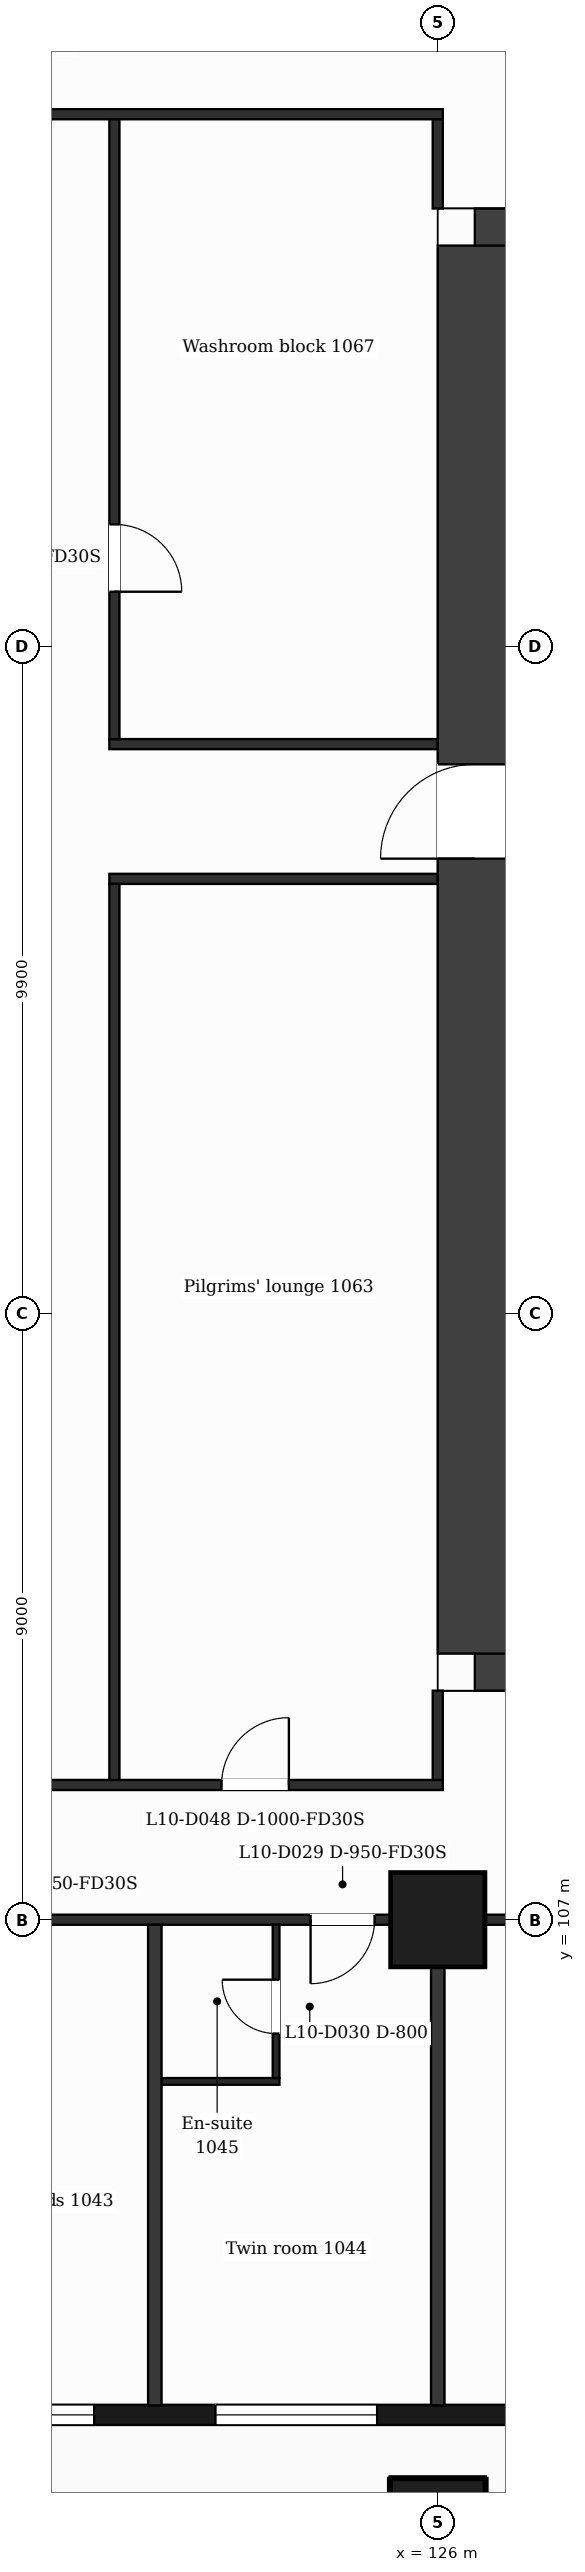
"""IFC4 building model, lengths in metres.
Left out: names, types, materials, properties, quantities, classifications, styles, units other than length and angle.
Written with IfcOpenShell. Run it as: python <this file> out.ifc"""

import sys

from ifc_helpers import new_model, si_unit, direction, frame, frame_2d, origin, origin_2d, place, context, subcontext, project, spatial, rectangle, extrude, element, fill, save


model = new_model("IFC4")
c1 = context("Model", 3, precision=1e-05, world=origin(), true_north=direction((0.0, 1.0)))
c2 = subcontext(c1, "Body", "Model", "MODEL_VIEW")
j1 = project(units=[si_unit("LENGTHUNIT", "METRE"), si_unit("PLANEANGLEUNIT", "RADIAN")], contexts=[c1])
p1 = place(None, origin())
s1 = spatial("IfcSite", under=j1, at=p1, CompositionType="ELEMENT")
p2 = place(p1, origin())
s2 = spatial("IfcBuilding", under=s1, at=p2, CompositionType="ELEMENT")
p3 = place(p2, frame((0.0, 0.0, 53.0)))
s3 = spatial("IfcBuildingStorey", under=s2, at=p3, CompositionType="ELEMENT", Elevation=53.0)
p4 = place(p3, frame((126.55, 131.85, 0.0), z_axis=(0.0, 0.0, 1.0), x_axis=(1.0, 0.0, 0.0)))
e1 = element("IfcWall", 1, at=p4, inside=s3, PredefinedType="SHEAR", context=c2, shape_type="SweptSolid", body=[
    extrude(rectangle(XDim=11.138, YDim=1.1, at=frame_2d((5.569, 0.0))), origin(), (0.0, 0.0, 1.0), 3.5),
])
p5 = place(p4, frame((3.386, 0.0, 0.0)))
e2 = element("IfcOpeningElement", 2, at=p5, cuts=e1, PredefinedType="OPENING", context=c2, shape_type="SweptSolid", body=[
    extrude(rectangle(XDim=1.2, YDim=2.1, at=frame_2d((0.6, 1.05))), frame((0.0, 0.56, 0.0), z_axis=(0.0, -1.0, 0.0), x_axis=(1.0, 0.0, 0.0)), (0.0, 0.0, 1.0), 1.12),
])
p6 = place(p3, frame((140.502, 110.95, 0.0), z_axis=(0.0, 0.0, 1.0), x_axis=(-1.0, 0.0, 0.0)))
e3 = element("IfcWall", 3, at=p6, inside=s3, PredefinedType="SHEAR", context=c2, shape_type="SweptSolid", body=[
    extrude(rectangle(XDim=13.952, YDim=1.1, at=frame_2d((6.976, 0.0))), origin(), (0.0, 0.0, 1.0), 3.5),
])
p7 = place(p6, frame((6.804, 0.0, 0.0)))
e4 = element("IfcOpeningElement", 4, at=p7, cuts=e3, PredefinedType="OPENING", context=c2, shape_type="SweptSolid", body=[
    extrude(rectangle(XDim=1.4, YDim=2.1, at=frame_2d((0.7, 1.05))), frame((0.0, 0.56, 0.0), z_axis=(0.0, -1.0, 0.0), x_axis=(1.0, 0.0, 0.0)), (0.0, 0.0, 1.0), 1.12),
])
p8 = place(p3, frame((126.55, 110.95, 0.0), z_axis=(0.0, 0.0, 1.0), x_axis=(0.0, 1.0, 0.0)))
e5 = element("IfcWall", 5, at=p8, inside=s3, PredefinedType="SHEAR", context=c2, shape_type="SweptSolid", body=[
    extrude(rectangle(XDim=20.9, YDim=1.1, at=frame_2d((10.45, 0.0))), origin(), (0.0, 0.0, 1.0), 3.5),
])
p9 = place(p8, frame((11.8, 0.0, 0.0)))
e6 = element("IfcOpeningElement", 6, at=p9, cuts=e5, PredefinedType="OPENING", context=c2, shape_type="SweptSolid", body=[
    extrude(rectangle(XDim=1.4, YDim=2.1, at=frame_2d((0.7, 1.05))), frame((0.0, 0.56, 0.0), z_axis=(0.0, -1.0, 0.0), x_axis=(1.0, 0.0, 0.0)), (0.0, 0.0, 1.0), 1.12),
])
for number, where, z_axis, x_axis in (
    (7, (126.0, 98.0, 0.0), (0.0, 0.0, 1.0), (1.0, 0.0, 0.0)),
    (8, (126.0, 107.0, 0.0), (0.0, 0.0, 1.0), (1.0, 0.0, 0.0)),
):
    element("IfcColumn", number, at=place(p3, frame(where, z_axis=z_axis, x_axis=x_axis)), inside=s3, PredefinedType="COLUMN", context=c2, shape_type="SweptSolid", body=[
        extrude(rectangle(XDim=1.4, YDim=1.4, at=origin_2d()), origin(), (0.0, 0.0, 1.0), 3.5),
    ])
p10 = place(p3, frame((89.85, 99.65, 0.0), z_axis=(0.0, 0.0, 1.0), x_axis=(1.0, 0.0, 0.0)))
e9 = element("IfcWall", 9, at=p10, inside=s3, PredefinedType="SOLIDWALL", context=c2, shape_type="SweptSolid", body=[
    extrude(rectangle(XDim=47.25, YDim=0.3, at=frame_2d((23.625, 0.0))), origin(), (0.0, 0.0, 1.0), 3.18),
])
p11 = place(p10, frame((0.725, 0.0, 0.9)))
e10 = element("IfcOpeningElement", 10, at=p11, cuts=e9, PredefinedType="OPENING", context=c2, shape_type="SweptSolid", body=[
    extrude(rectangle(XDim=1.2, YDim=2.1, at=frame_2d((0.6, 1.05))), frame((0.0, 0.16, 0.0), z_axis=(0.0, -1.0, 0.0), x_axis=(1.0, 0.0, 0.0)), (0.0, 0.0, 1.0), 0.32),
])
p12 = place(p10, frame((3.45, 0.0, 0.9)))
e11 = element("IfcOpeningElement", 11, at=p12, cuts=e9, PredefinedType="OPENING", context=c2, shape_type="SweptSolid", body=[
    extrude(rectangle(XDim=2.4, YDim=2.1, at=frame_2d((1.2, 1.05))), frame((0.0, 0.16, 0.0), z_axis=(0.0, -1.0, 0.0), x_axis=(1.0, 0.0, 0.0)), (0.0, 0.0, 1.0), 0.32),
])
p13 = place(p10, frame((8.25, 0.0, 0.9)))
e12 = element("IfcOpeningElement", 12, at=p13, cuts=e9, PredefinedType="OPENING", context=c2, shape_type="SweptSolid", body=[
    extrude(rectangle(XDim=1.2, YDim=2.1, at=frame_2d((0.6, 1.05))), frame((0.0, 0.16, 0.0), z_axis=(0.0, -1.0, 0.0), x_axis=(1.0, 0.0, 0.0)), (0.0, 0.0, 1.0), 0.32),
])
p14 = place(p10, frame((12.45, 0.0, 0.9)))
e13 = element("IfcOpeningElement", 13, at=p14, cuts=e9, PredefinedType="OPENING", context=c2, shape_type="SweptSolid", body=[
    extrude(rectangle(XDim=1.2, YDim=2.1, at=frame_2d((0.6, 1.05))), frame((0.0, 0.16, 0.0), z_axis=(0.0, -1.0, 0.0), x_axis=(1.0, 0.0, 0.0)), (0.0, 0.0, 1.0), 0.32),
])
p15 = place(p10, frame((16.05, 0.0, 0.9)))
e14 = element("IfcOpeningElement", 14, at=p15, cuts=e9, PredefinedType="OPENING", context=c2, shape_type="SweptSolid", body=[
    extrude(rectangle(XDim=2.4, YDim=2.1, at=frame_2d((1.2, 1.05))), frame((0.0, 0.16, 0.0), z_axis=(0.0, -1.0, 0.0), x_axis=(1.0, 0.0, 0.0)), (0.0, 0.0, 1.0), 0.32),
])
p16 = place(p10, frame((20.25, 0.0, 0.9)))
e15 = element("IfcOpeningElement", 15, at=p16, cuts=e9, PredefinedType="OPENING", context=c2, shape_type="SweptSolid", body=[
    extrude(rectangle(XDim=2.4, YDim=2.1, at=frame_2d((1.2, 1.05))), frame((0.0, 0.16, 0.0), z_axis=(0.0, -1.0, 0.0), x_axis=(1.0, 0.0, 0.0)), (0.0, 0.0, 1.0), 0.32),
])
p17 = place(p10, frame((25.05, 0.0, 0.0)))
e16 = element("IfcOpeningElement", 16, at=p17, cuts=e9, PredefinedType="OPENING", context=c2, shape_type="SweptSolid", body=[
    extrude(rectangle(XDim=1.2, YDim=2.4, at=frame_2d((0.6, 1.2))), frame((0.0, 0.16, 0.0), z_axis=(0.0, -1.0, 0.0), x_axis=(1.0, 0.0, 0.0)), (0.0, 0.0, 1.0), 0.32),
])
p18 = place(p10, frame((28.65, 0.0, 0.9)))
e17 = element("IfcOpeningElement", 17, at=p18, cuts=e9, PredefinedType="OPENING", context=c2, shape_type="SweptSolid", body=[
    extrude(rectangle(XDim=2.4, YDim=2.1, at=frame_2d((1.2, 1.05))), frame((0.0, 0.16, 0.0), z_axis=(0.0, -1.0, 0.0), x_axis=(1.0, 0.0, 0.0)), (0.0, 0.0, 1.0), 0.32),
])
p19 = place(p10, frame((32.85, 0.0, 0.9)))
e18 = element("IfcOpeningElement", 18, at=p19, cuts=e9, PredefinedType="OPENING", context=c2, shape_type="SweptSolid", body=[
    extrude(rectangle(XDim=2.4, YDim=2.1, at=frame_2d((1.2, 1.05))), frame((0.0, 0.16, 0.0), z_axis=(0.0, -1.0, 0.0), x_axis=(1.0, 0.0, 0.0)), (0.0, 0.0, 1.0), 0.32),
])
p20 = place(p10, frame((37.65, 0.0, 0.9)))
e19 = element("IfcOpeningElement", 19, at=p20, cuts=e9, PredefinedType="OPENING", context=c2, shape_type="SweptSolid", body=[
    extrude(rectangle(XDim=1.2, YDim=2.1, at=frame_2d((0.6, 1.05))), frame((0.0, 0.16, 0.0), z_axis=(0.0, -1.0, 0.0), x_axis=(1.0, 0.0, 0.0)), (0.0, 0.0, 1.0), 0.32),
])
p21 = place(p10, frame((41.85, 0.0, 0.9)))
e20 = element("IfcOpeningElement", 20, at=p21, cuts=e9, PredefinedType="OPENING", context=c2, shape_type="SweptSolid", body=[
    extrude(rectangle(XDim=1.2, YDim=2.1, at=frame_2d((0.6, 1.05))), frame((0.0, 0.16, 0.0), z_axis=(0.0, -1.0, 0.0), x_axis=(1.0, 0.0, 0.0)), (0.0, 0.0, 1.0), 0.32),
])
p22 = place(p10, frame((45.25, 0.0, 0.9)))
e21 = element("IfcOpeningElement", 21, at=p22, cuts=e9, PredefinedType="OPENING", context=c2, shape_type="SweptSolid", body=[
    extrude(rectangle(XDim=1.2, YDim=2.1, at=frame_2d((0.6, 1.05))), frame((0.0, 0.16, 0.0), z_axis=(0.0, -1.0, 0.0), x_axis=(1.0, 0.0, 0.0)), (0.0, 0.0, 1.0), 0.32),
])
p23 = place(p3, frame((121.8, 104.6, 0.0), z_axis=(0.0, 0.0, 1.0), x_axis=(1.0, 0.0, 0.0)))
e22 = element("IfcWall", 22, at=p23, inside=s3, PredefinedType="PARTITIONING", context=c2, shape_type="SweptSolid", body=[
    extrude(rectangle(XDim=1.85, YDim=0.1, at=frame_2d((0.925, 0.0))), origin(), (0.0, 0.0, 1.0), 3.18),
])
p24 = place(p3, frame((87.018, 107.0, 0.0), z_axis=(0.0, 0.0, 1.0), x_axis=(1.0, 0.0, 0.0)))
e23 = element("IfcWall", 23, at=p24, inside=s3, PredefinedType="PARTITIONING", context=c2, shape_type="SweptSolid", body=[
    extrude(rectangle(XDim=52.765, YDim=0.15, at=frame_2d((26.382, 0.0))), origin(), (0.0, 0.0, 1.0), 3.18),
])
p25 = place(p24, frame((0.87, 0.0, 0.0)))
e24 = element("IfcOpeningElement", 24, at=p25, cuts=e23, PredefinedType="OPENING", context=c2, shape_type="SweptSolid", body=[
    extrude(rectangle(XDim=0.95, YDim=2.1, at=frame_2d((0.475, 1.05))), frame((0.0, 0.085, 0.0), z_axis=(0.0, -1.0, 0.0), x_axis=(1.0, 0.0, 0.0)), (0.0, 0.0, 1.0), 0.17),
])
p26 = place(p24, frame((6.752, 0.0, 0.0)))
e25 = element("IfcOpeningElement", 25, at=p26, cuts=e23, PredefinedType="OPENING", context=c2, shape_type="SweptSolid", body=[
    extrude(rectangle(XDim=0.95, YDim=2.1, at=frame_2d((0.475, 1.05))), frame((0.0, 0.085, 0.0), z_axis=(0.0, -1.0, 0.0), x_axis=(1.0, 0.0, 0.0)), (0.0, 0.0, 1.0), 0.17),
])
p27 = place(p24, frame((9.857, 0.0, 0.0)))
e26 = element("IfcOpeningElement", 26, at=p27, cuts=e23, PredefinedType="OPENING", context=c2, shape_type="SweptSolid", body=[
    extrude(rectangle(XDim=0.95, YDim=2.1, at=frame_2d((0.475, 1.05))), frame((0.0, 0.085, 0.0), z_axis=(0.0, -1.0, 0.0), x_axis=(1.0, 0.0, 0.0)), (0.0, 0.0, 1.0), 0.17),
])
p28 = place(p24, frame((14.682, 0.0, 0.0)))
e27 = element("IfcOpeningElement", 27, at=p28, cuts=e23, PredefinedType="OPENING", context=c2, shape_type="SweptSolid", body=[
    extrude(rectangle(XDim=0.95, YDim=2.1, at=frame_2d((0.475, 1.05))), frame((0.0, 0.085, 0.0), z_axis=(0.0, -1.0, 0.0), x_axis=(1.0, 0.0, 0.0)), (0.0, 0.0, 1.0), 0.17),
])
p29 = place(p24, frame((19.862, 0.0, 0.0)))
e28 = element("IfcOpeningElement", 28, at=p29, cuts=e23, PredefinedType="OPENING", context=c2, shape_type="SweptSolid", body=[
    extrude(rectangle(XDim=0.95, YDim=2.1, at=frame_2d((0.475, 1.05))), frame((0.0, 0.085, 0.0), z_axis=(0.0, -1.0, 0.0), x_axis=(1.0, 0.0, 0.0)), (0.0, 0.0, 1.0), 0.17),
])
p30 = place(p24, frame((25.157, 0.0, 0.0)))
e29 = element("IfcOpeningElement", 29, at=p30, cuts=e23, PredefinedType="OPENING", context=c2, shape_type="SweptSolid", body=[
    extrude(rectangle(XDim=0.95, YDim=2.1, at=frame_2d((0.475, 1.05))), frame((0.0, 0.085, 0.0), z_axis=(0.0, -1.0, 0.0), x_axis=(1.0, 0.0, 0.0)), (0.0, 0.0, 1.0), 0.17),
])
p31 = place(p24, frame((28.262, 0.0, 0.0)))
e30 = element("IfcOpeningElement", 30, at=p31, cuts=e23, PredefinedType="OPENING", context=c2, shape_type="SweptSolid", body=[
    extrude(rectangle(XDim=0.95, YDim=2.1, at=frame_2d((0.475, 1.05))), frame((0.0, 0.085, 0.0), z_axis=(0.0, -1.0, 0.0), x_axis=(1.0, 0.0, 0.0)), (0.0, 0.0, 1.0), 0.17),
])
p32 = place(p24, frame((32.207, 0.0, 0.0)))
e31 = element("IfcOpeningElement", 31, at=p32, cuts=e23, PredefinedType="OPENING", context=c2, shape_type="SweptSolid", body=[
    extrude(rectangle(XDim=0.95, YDim=2.1, at=frame_2d((0.475, 1.05))), frame((0.0, 0.085, 0.0), z_axis=(0.0, -1.0, 0.0), x_axis=(1.0, 0.0, 0.0)), (0.0, 0.0, 1.0), 0.17),
])
p33 = place(p24, frame((37.094, 0.0, 0.0)))
e32 = element("IfcOpeningElement", 32, at=p33, cuts=e23, PredefinedType="OPENING", context=c2, shape_type="SweptSolid", body=[
    extrude(rectangle(XDim=0.95, YDim=2.1, at=frame_2d((0.475, 1.05))), frame((0.0, 0.085, 0.0), z_axis=(0.0, -1.0, 0.0), x_axis=(1.0, 0.0, 0.0)), (0.0, 0.0, 1.0), 0.17),
])
p34 = place(p24, frame((43.045, 0.0, 0.0)))
e33 = element("IfcOpeningElement", 33, at=p34, cuts=e23, PredefinedType="OPENING", context=c2, shape_type="SweptSolid", body=[
    extrude(rectangle(XDim=0.95, YDim=2.1, at=frame_2d((0.475, 1.05))), frame((0.0, 0.085, 0.0), z_axis=(0.0, -1.0, 0.0), x_axis=(1.0, 0.0, 0.0)), (0.0, 0.0, 1.0), 0.17),
])
p35 = place(p24, frame((49.285, 0.0, 0.0)))
e34 = element("IfcOpeningElement", 34, at=p35, cuts=e23, PredefinedType="OPENING", context=c2, shape_type="SweptSolid", body=[
    extrude(rectangle(XDim=0.95, YDim=2.1, at=frame_2d((0.475, 1.05))), frame((0.0, 0.085, 0.0), z_axis=(0.0, -1.0, 0.0), x_axis=(1.0, 0.0, 0.0)), (0.0, 0.0, 1.0), 0.17),
])
p36 = place(p3, frame((100.725, 109.0, 0.0), z_axis=(0.0, 0.0, 1.0), x_axis=(1.0, 0.0, 0.0)))
e35 = element("IfcWall", 35, at=p36, inside=s3, PredefinedType="PARTITIONING", context=c2, shape_type="SweptSolid", body=[
    extrude(rectangle(XDim=25.35, YDim=0.15, at=frame_2d((12.675, 0.0))), origin(), (0.0, 0.0, 1.0), 3.18),
])
p37 = place(p36, frame((1.975, 0.0, 0.0)))
e36 = element("IfcOpeningElement", 36, at=p37, cuts=e35, PredefinedType="OPENING", context=c2, shape_type="SweptSolid", body=[
    extrude(rectangle(XDim=1.0, YDim=2.1, at=frame_2d((0.5, 1.05))), frame((0.0, 0.085, 0.0), z_axis=(0.0, -1.0, 0.0), x_axis=(1.0, 0.0, 0.0)), (0.0, 0.0, 1.0), 0.17),
])
p38 = place(p36, frame((11.505, 0.0, 0.0)))
e37 = element("IfcOpeningElement", 37, at=p38, cuts=e35, PredefinedType="OPENING", context=c2, shape_type="SweptSolid", body=[
    extrude(rectangle(XDim=1.0, YDim=2.1, at=frame_2d((0.5, 1.05))), frame((0.0, 0.085, 0.0), z_axis=(0.0, -1.0, 0.0), x_axis=(1.0, 0.0, 0.0)), (0.0, 0.0, 1.0), 0.17),
])
p39 = place(p36, frame((22.065, 0.0, 0.0)))
e38 = element("IfcOpeningElement", 38, at=p39, cuts=e35, PredefinedType="OPENING", context=c2, shape_type="SweptSolid", body=[
    extrude(rectangle(XDim=1.0, YDim=2.1, at=frame_2d((0.5, 1.05))), frame((0.0, 0.085, 0.0), z_axis=(0.0, -1.0, 0.0), x_axis=(1.0, 0.0, 0.0)), (0.0, 0.0, 1.0), 0.17),
])
for number, where, z_axis, x_axis in (
    (39, (121.125, 122.45, 0.0), (0.0, 0.0, 1.0), (1.0, 0.0, 0.0)),
    (40, (121.125, 124.45, 0.0), (0.0, 0.0, 1.0), (1.0, 0.0, 0.0)),
):
    element("IfcWall", number, at=place(p3, frame(where, z_axis=z_axis, x_axis=x_axis)), inside=s3, PredefinedType="PARTITIONING", context=c2, shape_type="SweptSolid", body=[
        extrude(rectangle(XDim=4.875, YDim=0.15, at=frame_2d((2.438, 0.0))), origin(), (0.0, 0.0, 1.0), 3.18),
    ])
p40 = place(p3, frame((100.725, 133.8, 0.0), z_axis=(0.0, 0.0, 1.0), x_axis=(1.0, 0.0, 0.0)))
e41 = element("IfcWall", 41, at=p40, inside=s3, PredefinedType="PARTITIONING", context=c2, shape_type="SweptSolid", body=[
    extrude(rectangle(XDim=25.35, YDim=0.15, at=frame_2d((12.675, 0.0))), origin(), (0.0, 0.0, 1.0), 3.18),
])
p41 = place(p3, frame((121.2, 109.075, 0.0), z_axis=(0.0, 0.0, 1.0), x_axis=(0.0, 1.0, 0.0)))
e42 = element("IfcWall", 42, at=p41, inside=s3, PredefinedType="PARTITIONING", context=c2, shape_type="SweptSolid", body=[
    extrude(rectangle(XDim=13.3, YDim=0.15, at=frame_2d((6.65, 0.0))), origin(), (0.0, 0.0, 1.0), 3.18),
])
p42 = place(p3, frame((121.2, 124.525, 0.0), z_axis=(0.0, 0.0, 1.0), x_axis=(0.0, 1.0, 0.0)))
e43 = element("IfcWall", 43, at=p42, inside=s3, PredefinedType="PARTITIONING", context=c2, shape_type="SweptSolid", body=[
    extrude(rectangle(XDim=9.2, YDim=0.15, at=frame_2d((4.6, 0.0))), origin(), (0.0, 0.0, 1.0), 3.18),
])
p43 = place(p42, frame((2.187, 0.0, 0.0)))
e44 = element("IfcOpeningElement", 44, at=p43, cuts=e43, PredefinedType="OPENING", context=c2, shape_type="SweptSolid", body=[
    extrude(rectangle(XDim=1.0, YDim=2.1, at=frame_2d((0.5, 1.05))), frame((0.0, 0.085, 0.0), z_axis=(0.0, -1.0, 0.0), x_axis=(1.0, 0.0, 0.0)), (0.0, 0.0, 1.0), 0.17),
])
p44 = place(p3, frame((121.8, 99.79, 0.0), z_axis=(0.0, 0.0, 1.0), x_axis=(0.0, 1.0, 0.0)))
e45 = element("IfcWall", 45, at=p44, inside=s3, PredefinedType="PARTITIONING", context=c2, shape_type="SweptSolid", body=[
    extrude(rectangle(XDim=7.135, YDim=0.2, at=frame_2d((3.567, 0.0))), origin(), (0.0, 0.0, 1.0), 3.18),
])
p45 = place(p3, frame((123.6, 104.65, 0.0), z_axis=(0.0, 0.0, 1.0), x_axis=(0.0, 1.0, 0.0)))
e46 = element("IfcWall", 46, at=p45, inside=s3, PredefinedType="PARTITIONING", context=c2, shape_type="SweptSolid", body=[
    extrude(rectangle(XDim=2.275, YDim=0.1, at=frame_2d((1.138, 0.0))), origin(), (0.0, 0.0, 1.0), 3.18),
])
p46 = place(p45, frame((0.66, 0.0, 0.0)))
e47 = element("IfcOpeningElement", 47, at=p46, cuts=e46, PredefinedType="OPENING", context=c2, shape_type="SweptSolid", body=[
    extrude(rectangle(XDim=0.8, YDim=2.1, at=frame_2d((0.4, 1.05))), frame((0.0, 0.06, 0.0), z_axis=(0.0, -1.0, 0.0), x_axis=(1.0, 0.0, 0.0)), (0.0, 0.0, 1.0), 0.12),
])
p47 = place(p3, frame((126.0, 99.79, 0.0), z_axis=(0.0, 0.0, 1.0), x_axis=(0.0, 1.0, 0.0)))
e48 = element("IfcWall", 48, at=p47, inside=s3, PredefinedType="PARTITIONING", context=c2, shape_type="SweptSolid", body=[
    extrude(rectangle(XDim=7.135, YDim=0.2, at=frame_2d((3.567, 0.0))), origin(), (0.0, 0.0, 1.0), 3.18),
])
p48 = place(p3, frame((126.0, 109.075, 0.0), z_axis=(0.0, 0.0, 1.0), x_axis=(0.0, 1.0, 0.0)))
e49 = element("IfcWall", 49, at=p48, inside=s3, PredefinedType="PARTITIONING", context=c2, shape_type="SweptSolid", body=[
    extrude(rectangle(XDim=1.325, YDim=0.15, at=frame_2d((0.663, 0.0))), origin(), (0.0, 0.0, 1.0), 3.18),
])
p49 = place(p3, frame((126.0, 132.4, 0.0), z_axis=(0.0, 0.0, 1.0), x_axis=(0.0, 1.0, 0.0)))
e50 = element("IfcWall", 50, at=p49, inside=s3, PredefinedType="PARTITIONING", context=c2, shape_type="SweptSolid", body=[
    extrude(rectangle(XDim=1.325, YDim=0.15, at=frame_2d((0.663, 0.0))), origin(), (0.0, 0.0, 1.0), 3.18),
])
p50 = place(p18, origin())
e51 = element("IfcWindow", 51, at=p50, inside=s3, PartitioningType="SINGLE_PANEL", PredefinedType="WINDOW", context=c2, shape_type="SweptSolid", body=[
    extrude(rectangle(XDim=2.4, YDim=2.1, at=frame_2d((1.2, 1.05))), frame((0.0, 0.03, 0.0), z_axis=(0.0, -1.0, 0.0), x_axis=(1.0, 0.0, 0.0)), (0.0, 0.0, 1.0), 0.06),
])
fill(e17, e51)
p51 = place(p19, origin())
e52 = element("IfcWindow", 52, at=p51, inside=s3, PartitioningType="SINGLE_PANEL", PredefinedType="WINDOW", context=c2, shape_type="SweptSolid", body=[
    extrude(rectangle(XDim=2.4, YDim=2.1, at=frame_2d((1.2, 1.05))), frame((0.0, 0.03, 0.0), z_axis=(0.0, -1.0, 0.0), x_axis=(1.0, 0.0, 0.0)), (0.0, 0.0, 1.0), 0.06),
])
fill(e18, e52)
p52 = place(p33, origin())
e53 = element("IfcDoor", 53, at=p52, inside=s3, OperationType="SINGLE_SWING_LEFT", PredefinedType="DOOR", context=c2, shape_type="SweptSolid", body=[
    extrude(rectangle(XDim=0.95, YDim=2.1, at=frame_2d((0.475, 1.05))), frame((0.0, 0.025, 0.0), z_axis=(0.0, -1.0, 0.0), x_axis=(1.0, 0.0, 0.0)), (0.0, 0.0, 1.0), 0.05),
])
fill(e32, e53)
p53 = place(p46, origin())
e54 = element("IfcDoor", 54, at=p53, inside=s3, OperationType="SINGLE_SWING_RIGHT", PredefinedType="DOOR", context=c2, shape_type="SweptSolid", body=[
    extrude(rectangle(XDim=0.8, YDim=2.1, at=frame_2d((0.4, 1.05))), frame((0.0, 0.025, 0.0), z_axis=(0.0, -1.0, 0.0), x_axis=(1.0, 0.0, 0.0)), (0.0, 0.0, 1.0), 0.05),
])
fill(e47, e54)
p54 = place(p39, origin())
e55 = element("IfcDoor", 55, at=p54, inside=s3, OperationType="SINGLE_SWING_RIGHT", PredefinedType="DOOR", context=c2, shape_type="SweptSolid", body=[
    extrude(rectangle(XDim=1.0, YDim=2.1, at=frame_2d((0.5, 1.05))), frame((0.0, 0.025, 0.0), z_axis=(0.0, -1.0, 0.0), x_axis=(1.0, 0.0, 0.0)), (0.0, 0.0, 1.0), 0.05),
])
fill(e38, e55)
p55 = place(p43, origin())
e56 = element("IfcDoor", 56, at=p55, inside=s3, OperationType="SINGLE_SWING_LEFT", PredefinedType="DOOR", context=c2, shape_type="SweptSolid", body=[
    extrude(rectangle(XDim=1.0, YDim=2.1, at=frame_2d((0.5, 1.05))), frame((0.0, 0.025, 0.0), z_axis=(0.0, -1.0, 0.0), x_axis=(1.0, 0.0, 0.0)), (0.0, 0.0, 1.0), 0.05),
])
fill(e44, e56)
p56 = place(p9, origin())
e57 = element("IfcDoor", 57, at=p56, inside=s3, OperationType="SINGLE_SWING_LEFT", PredefinedType="DOOR", context=c2, shape_type="SweptSolid", body=[
    extrude(rectangle(XDim=1.4, YDim=2.1, at=frame_2d((0.7, 1.05))), frame((0.0, 0.025, 0.0), z_axis=(0.0, -1.0, 0.0), x_axis=(1.0, 0.0, 0.0)), (0.0, 0.0, 1.0), 0.05),
])
fill(e6, e57)
save(model, sys.argv[1])
